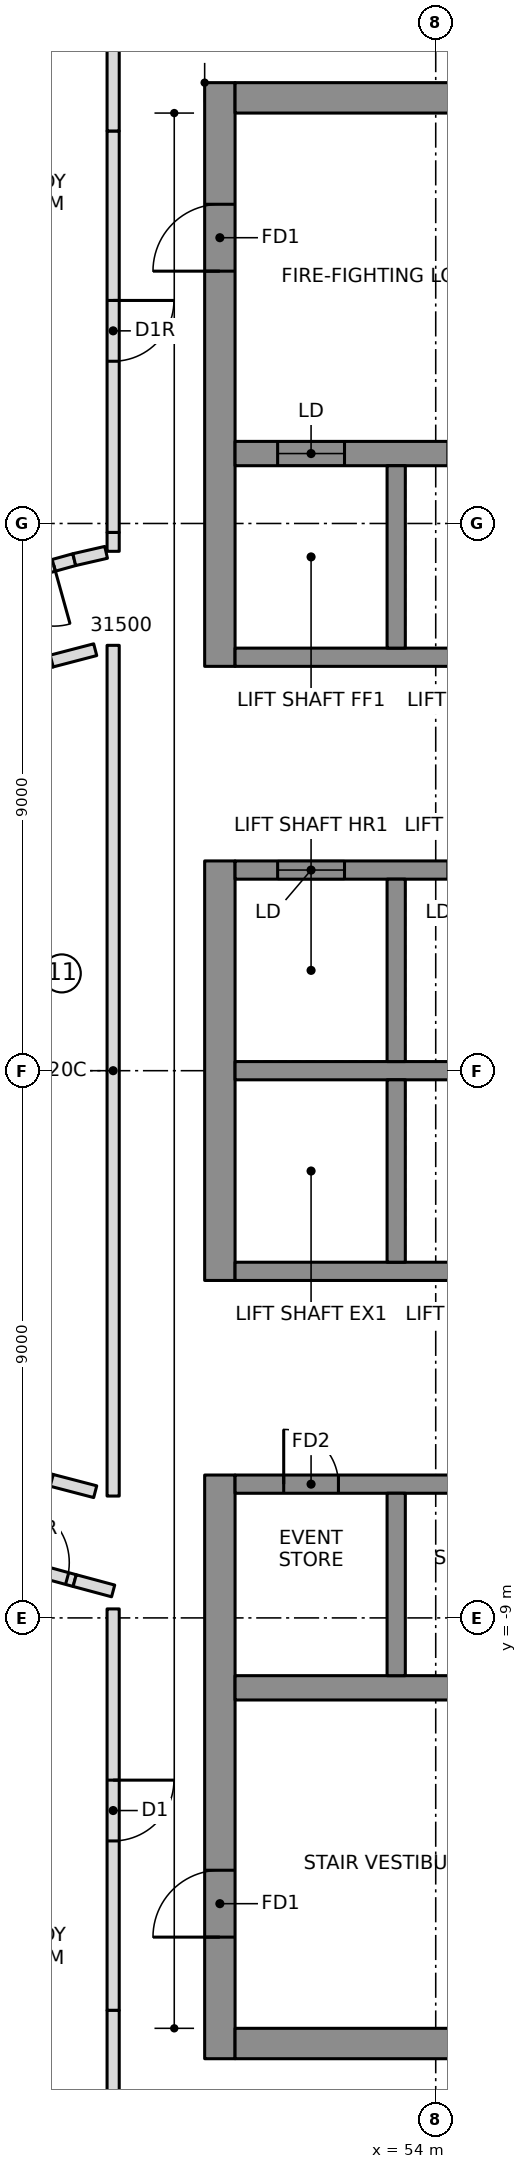
"""IFC4 building model, lengths in metres.
Left out: names, types, materials, properties, quantities, classifications, styles, units other than length and angle.
Written with IfcOpenShell. Run it as: python <this file> out.ifc"""

import sys

from ifc_helpers import new_model, si_unit, direction, frame, frame_2d, origin, place, context, subcontext, project, spatial, rectangle, extrude, element, fill, save


model = new_model("IFC4")
c1 = context("Model", 3, precision=1e-05, world=origin(), true_north=direction((0.0, 1.0)))
c2 = subcontext(c1, "Body", "Model", "MODEL_VIEW")
j1 = project(units=[si_unit("LENGTHUNIT", "METRE"), si_unit("PLANEANGLEUNIT", "RADIAN")], contexts=[c1])
p1 = place(None, origin())
s1 = spatial("IfcSite", under=j1, at=p1, CompositionType="ELEMENT")
p2 = place(p1, origin())
s2 = spatial("IfcBuilding", under=s1, at=p2, CompositionType="ELEMENT")
p3 = place(p2, frame((0.0, 0.0, 271.45)))
s3 = spatial("IfcBuildingStorey", under=s2, at=p3, CompositionType="ELEMENT", Elevation=271.45)
p4 = place(p3, frame((50.45, 6.65, 0.0), z_axis=(0.0, 0.0, 1.0), x_axis=(0.0, 1.0, 0.0)))
e1 = element("IfcWall", 1, at=p4, inside=s3, PredefinedType="SHEAR", context=c2, shape_type="SweptSolid", body=[
    extrude(rectangle(XDim=9.6, YDim=0.5, at=frame_2d((4.8, 0.0))), origin(), (0.0, 0.0, 1.0), 3.55),
])
p5 = place(p4, frame((6.5, 0.0, 0.0)))
e2 = element("IfcOpeningElement", 2, at=p5, cuts=e1, PredefinedType="OPENING", context=c2, shape_type="SweptSolid", body=[
    extrude(rectangle(XDim=1.1, YDim=2.1, at=frame_2d((0.55, 1.05))), frame((0.0, 0.26, 0.0), z_axis=(0.0, -1.0, 0.0), x_axis=(1.0, 0.0, 0.0)), (0.0, 0.0, 1.0), 0.52),
])
p6 = place(p3, frame((50.45, -3.45, 0.0), z_axis=(0.0, 0.0, 1.0), x_axis=(0.0, 1.0, 0.0)))
e3 = element("IfcWall", 3, at=p6, inside=s3, PredefinedType="SHEAR", context=c2, shape_type="SweptSolid", body=[
    extrude(rectangle(XDim=6.9, YDim=0.5, at=frame_2d((3.45, 0.0))), origin(), (0.0, 0.0, 1.0), 3.55),
])
p7 = place(p3, frame((50.45, -16.25, 0.0), z_axis=(0.0, 0.0, 1.0), x_axis=(0.0, 1.0, 0.0)))
e4 = element("IfcWall", 4, at=p7, inside=s3, PredefinedType="SHEAR", context=c2, shape_type="SweptSolid", body=[
    extrude(rectangle(XDim=9.6, YDim=0.5, at=frame_2d((4.8, 0.0))), origin(), (0.0, 0.0, 1.0), 3.55),
])
p8 = place(p7, frame((2.0, 0.0, 0.0)))
e5 = element("IfcOpeningElement", 5, at=p8, cuts=e4, PredefinedType="OPENING", context=c2, shape_type="SweptSolid", body=[
    extrude(rectangle(XDim=1.1, YDim=2.1, at=frame_2d((0.55, 1.05))), frame((0.0, 0.26, 0.0), z_axis=(0.0, -1.0, 0.0), x_axis=(1.0, 0.0, 0.0)), (0.0, 0.0, 1.0), 0.52),
])
for number, where, z_axis, x_axis in (
    (6, (50.7, 16.0, 0.0), (0.0, 0.0, 1.0), (1.0, 0.0, 0.0)),
    (7, (50.7, -16.0, 0.0), (0.0, 0.0, 1.0), (1.0, 0.0, 0.0)),
):
    element("IfcWall", number, at=place(p3, frame(where, z_axis=z_axis, x_axis=x_axis)), inside=s3, PredefinedType="SHEAR", context=c2, shape_type="SweptSolid", body=[
        extrude(rectangle(XDim=13.52, YDim=0.5, at=frame_2d((6.76, 0.0))), origin(), (0.0, 0.0, 1.0), 3.55),
    ])
p9 = place(p3, frame((50.7, 10.15, 0.0), z_axis=(0.0, 0.0, 1.0), x_axis=(1.0, 0.0, 0.0)))
e8 = element("IfcWall", 8, at=p9, inside=s3, PredefinedType="SHEAR", context=c2, shape_type="SweptSolid", body=[
    extrude(rectangle(XDim=13.02, YDim=0.4, at=frame_2d((6.51, 0.0))), origin(), (0.0, 0.0, 1.0), 3.55),
])
p10 = place(p9, frame((0.7, 0.0, 0.0)))
e9 = element("IfcOpeningElement", 9, at=p10, cuts=e8, PredefinedType="OPENING", context=c2, shape_type="SweptSolid", body=[
    extrude(rectangle(XDim=1.1, YDim=2.1, at=frame_2d((0.55, 1.05))), frame((0.0, 0.21, 0.0), z_axis=(0.0, -1.0, 0.0), x_axis=(1.0, 0.0, 0.0)), (0.0, 0.0, 1.0), 0.42),
])
p11 = place(p9, frame((3.5, 0.0, 0.0)))
e10 = element("IfcOpeningElement", 10, at=p11, cuts=e8, PredefinedType="OPENING", context=c2, shape_type="SweptSolid", body=[
    extrude(rectangle(XDim=1.1, YDim=2.1, at=frame_2d((0.55, 1.05))), frame((0.0, 0.21, 0.0), z_axis=(0.0, -1.0, 0.0), x_axis=(1.0, 0.0, 0.0)), (0.0, 0.0, 1.0), 0.42),
])
p12 = place(p3, frame((50.7, -10.15, 0.0), z_axis=(0.0, 0.0, 1.0), x_axis=(1.0, 0.0, 0.0)))
e11 = element("IfcWall", 11, at=p12, inside=s3, PredefinedType="SHEAR", context=c2, shape_type="SweptSolid", body=[
    extrude(rectangle(XDim=13.02, YDim=0.4, at=frame_2d((6.51, 0.0))), origin(), (0.0, 0.0, 1.0), 3.55),
])
p13 = place(p3, frame((50.7, 0.0, 0.0), z_axis=(0.0, 0.0, 1.0), x_axis=(1.0, 0.0, 0.0)))
e12 = element("IfcWall", 12, at=p13, inside=s3, PredefinedType="SHEAR", context=c2, shape_type="SweptSolid", body=[
    extrude(rectangle(XDim=10.9, YDim=0.3, at=frame_2d((5.45, 0.0))), origin(), (0.0, 0.0, 1.0), 3.55),
])
p14 = place(p3, frame((50.7, 3.3, 0.0), z_axis=(0.0, 0.0, 1.0), x_axis=(1.0, 0.0, 0.0)))
e13 = element("IfcWall", 13, at=p14, inside=s3, PredefinedType="SHEAR", context=c2, shape_type="SweptSolid", body=[
    extrude(rectangle(XDim=10.9, YDim=0.3, at=frame_2d((5.45, 0.0))), origin(), (0.0, 0.0, 1.0), 3.55),
])
p15 = place(p14, frame((0.7, 0.0, 0.0)))
e14 = element("IfcOpeningElement", 14, at=p15, cuts=e13, PredefinedType="OPENING", context=c2, shape_type="SweptSolid", body=[
    extrude(rectangle(XDim=1.1, YDim=2.1, at=frame_2d((0.55, 1.05))), frame((0.0, 0.16, 0.0), z_axis=(0.0, -1.0, 0.0), x_axis=(1.0, 0.0, 0.0)), (0.0, 0.0, 1.0), 0.32),
])
p16 = place(p14, frame((3.5, 0.0, 0.0)))
e15 = element("IfcOpeningElement", 15, at=p16, cuts=e13, PredefinedType="OPENING", context=c2, shape_type="SweptSolid", body=[
    extrude(rectangle(XDim=1.1, YDim=2.1, at=frame_2d((0.55, 1.05))), frame((0.0, 0.16, 0.0), z_axis=(0.0, -1.0, 0.0), x_axis=(1.0, 0.0, 0.0)), (0.0, 0.0, 1.0), 0.32),
])
p17 = place(p14, frame((6.4, 0.0, 0.0)))
e16 = element("IfcOpeningElement", 16, at=p17, cuts=e13, PredefinedType="OPENING", context=c2, shape_type="SweptSolid", body=[
    extrude(rectangle(XDim=0.9, YDim=2.1, at=frame_2d((0.45, 1.05))), frame((0.0, 0.16, 0.0), z_axis=(0.0, -1.0, 0.0), x_axis=(1.0, 0.0, 0.0)), (0.0, 0.0, 1.0), 0.32),
])
p18 = place(p14, frame((9.2, 0.0, 0.0)))
e17 = element("IfcOpeningElement", 17, at=p18, cuts=e13, PredefinedType="OPENING", context=c2, shape_type="SweptSolid", body=[
    extrude(rectangle(XDim=0.9, YDim=2.1, at=frame_2d((0.45, 1.05))), frame((0.0, 0.16, 0.0), z_axis=(0.0, -1.0, 0.0), x_axis=(1.0, 0.0, 0.0)), (0.0, 0.0, 1.0), 0.32),
])
p19 = place(p3, frame((50.7, 6.8, 0.0), z_axis=(0.0, 0.0, 1.0), x_axis=(1.0, 0.0, 0.0)))
e18 = element("IfcWall", 18, at=p19, inside=s3, PredefinedType="SHEAR", context=c2, shape_type="SweptSolid", body=[
    extrude(rectangle(XDim=10.9, YDim=0.3, at=frame_2d((5.45, 0.0))), origin(), (0.0, 0.0, 1.0), 3.55),
])
p20 = place(p19, frame((6.4, 0.0, 0.0)))
e19 = element("IfcOpeningElement", 19, at=p20, cuts=e18, PredefinedType="OPENING", context=c2, shape_type="SweptSolid", body=[
    extrude(rectangle(XDim=0.9, YDim=2.1, at=frame_2d((0.45, 1.05))), frame((0.0, 0.16, 0.0), z_axis=(0.0, -1.0, 0.0), x_axis=(1.0, 0.0, 0.0)), (0.0, 0.0, 1.0), 0.32),
])
p21 = place(p19, frame((9.2, 0.0, 0.0)))
e20 = element("IfcOpeningElement", 20, at=p21, cuts=e18, PredefinedType="OPENING", context=c2, shape_type="SweptSolid", body=[
    extrude(rectangle(XDim=0.9, YDim=2.1, at=frame_2d((0.45, 1.05))), frame((0.0, 0.16, 0.0), z_axis=(0.0, -1.0, 0.0), x_axis=(1.0, 0.0, 0.0)), (0.0, 0.0, 1.0), 0.32),
])
for number, where, z_axis, x_axis in (
    (21, (53.35, 0.15, 0.0), (0.0, 0.0, 1.0), (0.0, 1.0, 0.0)),
    (22, (53.35, 6.95, 0.0), (0.0, 0.0, 1.0), (0.0, 1.0, 0.0)),
):
    element("IfcWall", number, at=place(p3, frame(where, z_axis=z_axis, x_axis=x_axis)), inside=s3, PredefinedType="SHEAR", context=c2, shape_type="SweptSolid", body=[
        extrude(rectangle(XDim=3.0, YDim=0.3, at=frame_2d((1.5, 0.0))), origin(), (0.0, 0.0, 1.0), 3.55),
    ])
p22 = place(p3, frame((50.7, -3.3, 0.0), z_axis=(0.0, 0.0, 1.0), x_axis=(1.0, 0.0, 0.0)))
e23 = element("IfcWall", 23, at=p22, inside=s3, PredefinedType="SHEAR", context=c2, shape_type="SweptSolid", body=[
    extrude(rectangle(XDim=10.9, YDim=0.3, at=frame_2d((5.45, 0.0))), origin(), (0.0, 0.0, 1.0), 3.55),
])
p23 = place(p22, frame((9.1, 0.0, 0.0)))
e24 = element("IfcOpeningElement", 24, at=p23, cuts=e23, PredefinedType="OPENING", context=c2, shape_type="SweptSolid", body=[
    extrude(rectangle(XDim=1.1, YDim=2.1, at=frame_2d((0.55, 1.05))), frame((0.0, 0.16, 0.0), z_axis=(0.0, -1.0, 0.0), x_axis=(1.0, 0.0, 0.0)), (0.0, 0.0, 1.0), 0.32),
])
p24 = place(p3, frame((50.7, -6.8, 0.0), z_axis=(0.0, 0.0, 1.0), x_axis=(1.0, 0.0, 0.0)))
e25 = element("IfcWall", 25, at=p24, inside=s3, PredefinedType="SHEAR", context=c2, shape_type="SweptSolid", body=[
    extrude(rectangle(XDim=10.9, YDim=0.3, at=frame_2d((5.45, 0.0))), origin(), (0.0, 0.0, 1.0), 3.55),
])
p25 = place(p24, frame((6.3, 0.0, 0.0)))
e26 = element("IfcOpeningElement", 26, at=p25, cuts=e25, PredefinedType="OPENING", context=c2, shape_type="SweptSolid", body=[
    extrude(rectangle(XDim=1.1, YDim=2.1, at=frame_2d((0.55, 1.05))), frame((0.0, 0.16, 0.0), z_axis=(0.0, -1.0, 0.0), x_axis=(1.0, 0.0, 0.0)), (0.0, 0.0, 1.0), 0.32),
])
p26 = place(p24, frame((9.1, 0.0, 0.0)))
e27 = element("IfcOpeningElement", 27, at=p26, cuts=e25, PredefinedType="OPENING", context=c2, shape_type="SweptSolid", body=[
    extrude(rectangle(XDim=1.1, YDim=2.1, at=frame_2d((0.55, 1.05))), frame((0.0, 0.16, 0.0), z_axis=(0.0, -1.0, 0.0), x_axis=(1.0, 0.0, 0.0)), (0.0, 0.0, 1.0), 0.32),
])
p27 = place(p24, frame((0.8, 0.0, 0.0)))
e28 = element("IfcOpeningElement", 28, at=p27, cuts=e25, PredefinedType="OPENING", context=c2, shape_type="SweptSolid", body=[
    extrude(rectangle(XDim=0.9, YDim=2.1, at=frame_2d((0.45, 1.05))), frame((0.0, 0.16, 0.0), z_axis=(0.0, -1.0, 0.0), x_axis=(1.0, 0.0, 0.0)), (0.0, 0.0, 1.0), 0.32),
])
p28 = place(p24, frame((3.6, 0.0, 0.0)))
e29 = element("IfcOpeningElement", 29, at=p28, cuts=e25, PredefinedType="OPENING", context=c2, shape_type="SweptSolid", body=[
    extrude(rectangle(XDim=0.9, YDim=2.1, at=frame_2d((0.45, 1.05))), frame((0.0, 0.16, 0.0), z_axis=(0.0, -1.0, 0.0), x_axis=(1.0, 0.0, 0.0)), (0.0, 0.0, 1.0), 0.32),
])
for number, where, z_axis, x_axis in (
    (30, (53.35, -3.15, 0.0), (0.0, 0.0, 1.0), (0.0, 1.0, 0.0)),
    (31, (53.35, -9.95, 0.0), (0.0, 0.0, 1.0), (0.0, 1.0, 0.0)),
):
    element("IfcWall", number, at=place(p3, frame(where, z_axis=z_axis, x_axis=x_axis)), inside=s3, PredefinedType="SHEAR", context=c2, shape_type="SweptSolid", body=[
        extrude(rectangle(XDim=3.0, YDim=0.3, at=frame_2d((1.5, 0.0))), origin(), (0.0, 0.0, 1.0), 3.55),
    ])
p29 = place(p3, frame((48.056, 8.405, 0.0), z_axis=(0.0, 0.0, 1.0), x_axis=(-0.963429942227, -0.267960344866, 0.0)))
e32 = element("IfcWall", 32, at=p29, inside=s3, PredefinedType="PARTITIONING", context=c2, shape_type="SweptSolid", body=[
    extrude(rectangle(XDim=4.177, YDim=0.2, at=frame_2d((2.089, 0.0))), origin(), (0.0, 0.0, 1.0), 3.25),
])
p30 = place(p29, frame((0.35, 0.0, 0.0)))
e33 = element("IfcOpeningElement", 33, at=p30, cuts=e32, PredefinedType="OPENING", context=c2, shape_type="SweptSolid", body=[
    extrude(rectangle(XDim=1.0, YDim=2.1, at=frame_2d((0.5, 1.05))), frame((0.0, 0.11, 0.0), z_axis=(0.0, -1.0, 0.0), x_axis=(1.0, 0.0, 0.0)), (0.0, 0.0, 1.0), 0.22),
])
p31 = place(p3, frame((44.031, -7.286, 0.0), z_axis=(0.0, 0.0, 1.0), x_axis=(0.964708521199, -0.263320088726, 0.0)))
e34 = element("IfcWall", 34, at=p31, inside=s3, PredefinedType="PARTITIONING", context=c2, shape_type="SweptSolid", body=[
    extrude(rectangle(XDim=4.179, YDim=0.2, at=frame_2d((2.089, 0.0))), origin(), (0.0, 0.0, 1.0), 3.25),
])
p32 = place(p31, frame((3.05, 0.0, 0.0)))
e35 = element("IfcOpeningElement", 35, at=p32, cuts=e34, PredefinedType="OPENING", context=c2, shape_type="SweptSolid", body=[
    extrude(rectangle(XDim=1.0, YDim=2.1, at=frame_2d((0.5, 1.05))), frame((0.0, 0.11, 0.0), z_axis=(0.0, -1.0, 0.0), x_axis=(1.0, 0.0, 0.0)), (0.0, 0.0, 1.0), 0.22),
])
p33 = place(p3, frame((43.918, 5.675, 0.0), z_axis=(0.0, 0.0, 1.0), x_axis=(0.962411212211, 0.271596499628, 0.0)))
e36 = element("IfcWall", 36, at=p33, inside=s3, PredefinedType="PARTITIONING", context=c2, shape_type="SweptSolid", body=[
    extrude(rectangle(XDim=3.913, YDim=0.2, at=frame_2d((1.957, 0.0))), origin(), (0.0, 0.0, 1.0), 3.25),
])
p34 = place(p33, frame((1.457, 0.0, 0.0)))
e37 = element("IfcOpeningElement", 37, at=p34, cuts=e36, PredefinedType="OPENING", context=c2, shape_type="SweptSolid", body=[
    extrude(rectangle(XDim=1.0, YDim=2.1, at=frame_2d((0.5, 1.05))), frame((0.0, 0.11, 0.0), z_axis=(0.0, -1.0, 0.0), x_axis=(1.0, 0.0, 0.0)), (0.0, 0.0, 1.0), 0.22),
])
p35 = place(p3, frame((47.684, -6.738, 0.0), z_axis=(0.0, 0.0, 1.0), x_axis=(-0.962411212211, 0.271596499628, 0.0)))
e38 = element("IfcWall", 38, at=p35, inside=s3, PredefinedType="PARTITIONING", context=c2, shape_type="SweptSolid", body=[
    extrude(rectangle(XDim=3.913, YDim=0.2, at=frame_2d((1.957, 0.0))), origin(), (0.0, 0.0, 1.0), 3.25),
])
for number, where, z_axis, x_axis in (
    (39, (47.684, 6.738, 0.0), (0.0, 0.0, 1.0), (0.968, 0.253, 0.0)),
    (40, (48.4, -6.924, 0.0), (0.0, 0.0, 1.0), (-0.968, 0.253, 0.0)),
):
    element("IfcWall", number, at=place(p3, frame(where, z_axis=z_axis, x_axis=x_axis)), inside=s3, PredefinedType="PARTITIONING", context=c2, shape_type="SweptSolid", body=[
        extrude(rectangle(XDim=0.74, YDim=0.2, at=frame_2d((0.37, 0.0))), origin(), (0.0, 0.0, 1.0), 3.25),
    ])
p36 = place(p3, frame((48.695, 15.455, 0.0), z_axis=(0.0, 0.0, 1.0), x_axis=(0.0, -1.0, 0.0)))
e41 = element("IfcWall", 41, at=p36, inside=s3, PredefinedType="PARTITIONING", context=c2, shape_type="SweptSolid", body=[
    extrude(rectangle(XDim=6.603, YDim=0.2, at=frame_2d((3.302, 0.0))), origin(), (0.0, 0.0, 1.0), 3.25),
])
p37 = place(p36, frame((2.787, 0.0, 0.0)))
e42 = element("IfcOpeningElement", 42, at=p37, cuts=e41, PredefinedType="OPENING", context=c2, shape_type="SweptSolid", body=[
    extrude(rectangle(XDim=1.0, YDim=2.1, at=frame_2d((0.5, 1.05))), frame((0.0, 0.11, 0.0), z_axis=(0.0, -1.0, 0.0), x_axis=(1.0, 0.0, 0.0)), (0.0, 0.0, 1.0), 0.22),
])
p38 = place(p3, frame((48.695, -8.852, 0.0), z_axis=(0.0, 0.0, 1.0), x_axis=(0.0, -1.0, 0.0)))
e43 = element("IfcWall", 43, at=p38, inside=s3, PredefinedType="PARTITIONING", context=c2, shape_type="SweptSolid", body=[
    extrude(rectangle(XDim=6.603, YDim=0.2, at=frame_2d((3.302, 0.0))), origin(), (0.0, 0.0, 1.0), 3.25),
])
p39 = place(p38, frame((2.816, 0.0, 0.0)))
e44 = element("IfcOpeningElement", 44, at=p39, cuts=e43, PredefinedType="OPENING", context=c2, shape_type="SweptSolid", body=[
    extrude(rectangle(XDim=1.0, YDim=2.1, at=frame_2d((0.5, 1.05))), frame((0.0, 0.11, 0.0), z_axis=(0.0, -1.0, 0.0), x_axis=(1.0, 0.0, 0.0)), (0.0, 0.0, 1.0), 0.22),
])
p40 = place(p3, frame((48.695, 6.996, 0.0), z_axis=(0.0, 0.0, 1.0), x_axis=(0.0, -1.0, 0.0)))
e45 = element("IfcWall", 45, at=p40, inside=s3, PredefinedType="PARTITIONING", context=c2, shape_type="SweptSolid", body=[
    extrude(rectangle(XDim=13.992, YDim=0.2, at=frame_2d((6.996, 0.0))), origin(), (0.0, 0.0, 1.0), 3.25),
])
p41 = place(p3, frame((48.695, 18.553, 0.0), z_axis=(0.0, 0.0, 1.0), x_axis=(0.0, -1.0, 0.0)))
e46 = element("IfcWall", 46, at=p41, inside=s3, PredefinedType="PARTITIONING", context=c2, shape_type="SweptSolid", body=[
    extrude(rectangle(XDim=3.098, YDim=0.2, at=frame_2d((1.549, 0.0))), origin(), (0.0, 0.0, 1.0), 3.25),
])
p42 = place(p3, frame((48.695, 8.852, 0.0), z_axis=(0.0, 0.0, 1.0), x_axis=(0.0, -1.0, 0.0)))
e47 = element("IfcWall", 47, at=p42, inside=s3, PredefinedType="PARTITIONING", context=c2, shape_type="SweptSolid", body=[
    extrude(rectangle(XDim=0.31, YDim=0.2, at=frame_2d((0.155, 0.0))), origin(), (0.0, 0.0, 1.0), 3.25),
])
p43 = place(p3, frame((48.579, 8.525, 0.0), z_axis=(0.0, 0.0, 1.0), x_axis=(-0.974742633665, -0.223331140051, 0.0)))
e48 = element("IfcWall", 48, at=p43, inside=s3, PredefinedType="PARTITIONING", context=c2, shape_type="SweptSolid", body=[
    extrude(rectangle(XDim=0.537, YDim=0.2, at=frame_2d((0.269, 0.0))), origin(), (0.0, 0.0, 1.0), 3.25),
])
p44 = place(p3, frame((48.062, -8.386, 0.0), z_axis=(0.0, 0.0, 1.0), x_axis=(0.965669715173, -0.259772980114, 0.0)))
e49 = element("IfcWall", 49, at=p44, inside=s3, PredefinedType="PARTITIONING", context=c2, shape_type="SweptSolid", body=[
    extrude(rectangle(XDim=0.655, YDim=0.2, at=frame_2d((0.328, 0.0))), origin(), (0.0, 0.0, 1.0), 3.25),
])
p45 = place(p3, frame((48.695, -15.455, 0.0), z_axis=(0.0, 0.0, 1.0), x_axis=(0.0, -1.0, 0.0)))
e50 = element("IfcWall", 50, at=p45, inside=s3, PredefinedType="PARTITIONING", context=c2, shape_type="SweptSolid", body=[
    extrude(rectangle(XDim=3.098, YDim=0.2, at=frame_2d((1.549, 0.0))), origin(), (0.0, 0.0, 1.0), 3.25),
])
p46 = place(p30, origin())
e51 = element("IfcDoor", 51, at=p46, inside=s3, OperationType="SINGLE_SWING_RIGHT", PredefinedType="DOOR", context=c2, shape_type="SweptSolid", body=[
    extrude(rectangle(XDim=1.0, YDim=2.1, at=frame_2d((0.5, 1.05))), frame((0.0, 0.025, 0.0), z_axis=(0.0, -1.0, 0.0), x_axis=(1.0, 0.0, 0.0)), (0.0, 0.0, 1.0), 0.05),
])
fill(e33, e51)
p47 = place(p32, origin())
e52 = element("IfcDoor", 52, at=p47, inside=s3, OperationType="SINGLE_SWING_RIGHT", PredefinedType="DOOR", context=c2, shape_type="SweptSolid", body=[
    extrude(rectangle(XDim=1.0, YDim=2.1, at=frame_2d((0.5, 1.05))), frame((0.0, 0.025, 0.0), z_axis=(0.0, -1.0, 0.0), x_axis=(1.0, 0.0, 0.0)), (0.0, 0.0, 1.0), 0.05),
])
fill(e35, e52)
p48 = place(p37, origin())
e53 = element("IfcDoor", 53, at=p48, inside=s3, OperationType="SINGLE_SWING_RIGHT", PredefinedType="DOOR", context=c2, shape_type="SweptSolid", body=[
    extrude(rectangle(XDim=1.0, YDim=2.1, at=frame_2d((0.5, 1.05))), frame((0.0, 0.025, 0.0), z_axis=(0.0, -1.0, 0.0), x_axis=(1.0, 0.0, 0.0)), (0.0, 0.0, 1.0), 0.05),
])
fill(e42, e53)
p49 = place(p39, origin())
e54 = element("IfcDoor", 54, at=p49, inside=s3, OperationType="SINGLE_SWING_LEFT", PredefinedType="DOOR", context=c2, shape_type="SweptSolid", body=[
    extrude(rectangle(XDim=1.0, YDim=2.1, at=frame_2d((0.5, 1.05))), frame((0.0, 0.025, 0.0), z_axis=(0.0, -1.0, 0.0), x_axis=(1.0, 0.0, 0.0)), (0.0, 0.0, 1.0), 0.05),
])
fill(e44, e54)
p50 = place(p10, origin())
e55 = element("IfcDoor", 55, at=p50, inside=s3, OperationType="DOUBLE_DOOR_SLIDING", PredefinedType="DOOR", context=c2, shape_type="SweptSolid", body=[
    extrude(rectangle(XDim=1.1, YDim=2.1, at=frame_2d((0.55, 1.05))), frame((0.0, 0.025, 0.0), z_axis=(0.0, -1.0, 0.0), x_axis=(1.0, 0.0, 0.0)), (0.0, 0.0, 1.0), 0.05),
])
fill(e9, e55)
p51 = place(p15, origin())
e56 = element("IfcDoor", 56, at=p51, inside=s3, OperationType="DOUBLE_DOOR_SLIDING", PredefinedType="DOOR", context=c2, shape_type="SweptSolid", body=[
    extrude(rectangle(XDim=1.1, YDim=2.1, at=frame_2d((0.55, 1.05))), frame((0.0, 0.025, 0.0), z_axis=(0.0, -1.0, 0.0), x_axis=(1.0, 0.0, 0.0)), (0.0, 0.0, 1.0), 0.05),
])
fill(e14, e56)
p52 = place(p5, origin())
e57 = element("IfcDoor", 57, at=p52, inside=s3, OperationType="SINGLE_SWING_RIGHT", PredefinedType="DOOR", context=c2, shape_type="SweptSolid", body=[
    extrude(rectangle(XDim=1.1, YDim=2.1, at=frame_2d((0.55, 1.05))), frame((0.0, 0.025, 0.0), z_axis=(0.0, -1.0, 0.0), x_axis=(1.0, 0.0, 0.0)), (0.0, 0.0, 1.0), 0.05),
])
fill(e2, e57)
p53 = place(p8, origin())
e58 = element("IfcDoor", 58, at=p53, inside=s3, OperationType="SINGLE_SWING_RIGHT", PredefinedType="DOOR", context=c2, shape_type="SweptSolid", body=[
    extrude(rectangle(XDim=1.1, YDim=2.1, at=frame_2d((0.55, 1.05))), frame((0.0, 0.025, 0.0), z_axis=(0.0, -1.0, 0.0), x_axis=(1.0, 0.0, 0.0)), (0.0, 0.0, 1.0), 0.05),
])
fill(e5, e58)
p54 = place(p27, origin())
e59 = element("IfcDoor", 59, at=p54, inside=s3, OperationType="SINGLE_SWING_LEFT", PredefinedType="DOOR", context=c2, shape_type="SweptSolid", body=[
    extrude(rectangle(XDim=0.9, YDim=2.1, at=frame_2d((0.45, 1.05))), frame((0.0, 0.025, 0.0), z_axis=(0.0, -1.0, 0.0), x_axis=(1.0, 0.0, 0.0)), (0.0, 0.0, 1.0), 0.05),
])
fill(e28, e59)
save(model, sys.argv[1])
